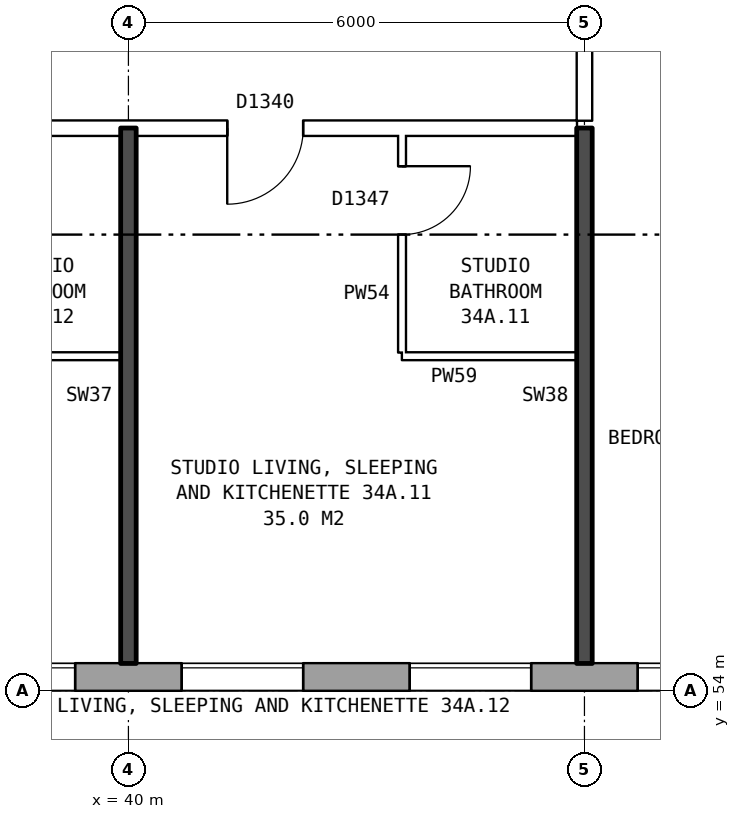
"""IFC4 building model, lengths in metres.
Left out: names, types, materials, properties, quantities, classifications, styles, units other than length and angle.
Written with IfcOpenShell. Run it as: python <this file> out.ifc"""

import sys

from ifc_helpers import new_model, si_unit, direction, frame, frame_2d, origin, place, context, subcontext, project, spatial, rectangle, extrude, element, fill, save


model = new_model("IFC4")
c1 = context("Model", 3, precision=1e-05, world=origin(), true_north=direction((0.0, 1.0)))
c2 = subcontext(c1, "Body", "Model", "MODEL_VIEW")
j1 = project(units=[si_unit("LENGTHUNIT", "METRE"), si_unit("PLANEANGLEUNIT", "RADIAN")], contexts=[c1])
p1 = place(None, origin())
s1 = spatial("IfcSite", under=j1, at=p1, CompositionType="ELEMENT")
p2 = place(p1, origin())
s2 = spatial("IfcBuilding", under=s1, at=p2, CompositionType="ELEMENT")
p3 = place(p2, frame((0.0, 0.0, 123.7)))
s3 = spatial("IfcBuildingStorey", under=s2, at=p3, CompositionType="ELEMENT", Elevation=123.7)
p4 = place(p3, frame((29.825, 54.18, 0.0), z_axis=(0.0, 0.0, 1.0), x_axis=(1.0, 0.0, 0.0)))
e1 = element("IfcWall", 1, at=p4, inside=s3, PredefinedType="STANDARD", context=c2, shape_type="SweptSolid", body=[
    extrude(rectangle(XDim=43.101, YDim=0.36, at=frame_2d((21.55, 0.0))), origin(), (0.0, 0.0, 1.0), 2.85),
])
p5 = place(p4, frame((0.3, 0.0, 0.8)))
e2 = element("IfcOpeningElement", 2, at=p5, cuts=e1, PredefinedType="OPENING", context=c2, shape_type="SweptSolid", body=[
    extrude(rectangle(XDim=1.6, YDim=1.8, at=frame_2d((0.8, 0.9))), frame((0.0, 0.19, 0.0), z_axis=(0.0, -1.0, 0.0), x_axis=(1.0, 0.0, 0.0)), (0.0, 0.0, 1.0), 0.38),
])
p6 = place(p4, frame((4.875, 0.0, 0.8)))
e3 = element("IfcOpeningElement", 3, at=p6, cuts=e1, PredefinedType="OPENING", context=c2, shape_type="SweptSolid", body=[
    extrude(rectangle(XDim=1.6, YDim=1.8, at=frame_2d((0.8, 0.9))), frame((0.0, 0.19, 0.0), z_axis=(0.0, -1.0, 0.0), x_axis=(1.0, 0.0, 0.0)), (0.0, 0.0, 1.0), 0.38),
])
p7 = place(p4, frame((7.875, 0.0, 0.8)))
e4 = element("IfcOpeningElement", 4, at=p7, cuts=e1, PredefinedType="OPENING", context=c2, shape_type="SweptSolid", body=[
    extrude(rectangle(XDim=1.6, YDim=1.8, at=frame_2d((0.8, 0.9))), frame((0.0, 0.19, 0.0), z_axis=(0.0, -1.0, 0.0), x_axis=(1.0, 0.0, 0.0)), (0.0, 0.0, 1.0), 0.38),
])
p8 = place(p4, frame((10.875, 0.0, 0.8)))
e5 = element("IfcOpeningElement", 5, at=p8, cuts=e1, PredefinedType="OPENING", context=c2, shape_type="SweptSolid", body=[
    extrude(rectangle(XDim=1.6, YDim=1.8, at=frame_2d((0.8, 0.9))), frame((0.0, 0.19, 0.0), z_axis=(0.0, -1.0, 0.0), x_axis=(1.0, 0.0, 0.0)), (0.0, 0.0, 1.0), 0.38),
])
p9 = place(p4, frame((13.875, 0.0, 0.8)))
e6 = element("IfcOpeningElement", 6, at=p9, cuts=e1, PredefinedType="OPENING", context=c2, shape_type="SweptSolid", body=[
    extrude(rectangle(XDim=1.6, YDim=1.8, at=frame_2d((0.8, 0.9))), frame((0.0, 0.19, 0.0), z_axis=(0.0, -1.0, 0.0), x_axis=(1.0, 0.0, 0.0)), (0.0, 0.0, 1.0), 0.38),
])
p10 = place(p4, frame((16.875, 0.0, 0.8)))
e7 = element("IfcOpeningElement", 7, at=p10, cuts=e1, PredefinedType="OPENING", context=c2, shape_type="SweptSolid", body=[
    extrude(rectangle(XDim=1.6, YDim=1.8, at=frame_2d((0.8, 0.9))), frame((0.0, 0.19, 0.0), z_axis=(0.0, -1.0, 0.0), x_axis=(1.0, 0.0, 0.0)), (0.0, 0.0, 1.0), 0.38),
])
p11 = place(p4, frame((19.875, 0.0, 0.8)))
e8 = element("IfcOpeningElement", 8, at=p11, cuts=e1, PredefinedType="OPENING", context=c2, shape_type="SweptSolid", body=[
    extrude(rectangle(XDim=1.6, YDim=1.8, at=frame_2d((0.8, 0.9))), frame((0.0, 0.19, 0.0), z_axis=(0.0, -1.0, 0.0), x_axis=(1.0, 0.0, 0.0)), (0.0, 0.0, 1.0), 0.38),
])
p12 = place(p4, frame((22.875, 0.0, 0.8)))
e9 = element("IfcOpeningElement", 9, at=p12, cuts=e1, PredefinedType="OPENING", context=c2, shape_type="SweptSolid", body=[
    extrude(rectangle(XDim=1.6, YDim=1.8, at=frame_2d((0.8, 0.9))), frame((0.0, 0.19, 0.0), z_axis=(0.0, -1.0, 0.0), x_axis=(1.0, 0.0, 0.0)), (0.0, 0.0, 1.0), 0.38),
])
p13 = place(p4, frame((25.875, 0.0, 0.8)))
e10 = element("IfcOpeningElement", 10, at=p13, cuts=e1, PredefinedType="OPENING", context=c2, shape_type="SweptSolid", body=[
    extrude(rectangle(XDim=1.6, YDim=1.8, at=frame_2d((0.8, 0.9))), frame((0.0, 0.19, 0.0), z_axis=(0.0, -1.0, 0.0), x_axis=(1.0, 0.0, 0.0)), (0.0, 0.0, 1.0), 0.38),
])
p14 = place(p4, frame((28.875, 0.0, 0.8)))
e11 = element("IfcOpeningElement", 11, at=p14, cuts=e1, PredefinedType="OPENING", context=c2, shape_type="SweptSolid", body=[
    extrude(rectangle(XDim=1.6, YDim=1.8, at=frame_2d((0.8, 0.9))), frame((0.0, 0.19, 0.0), z_axis=(0.0, -1.0, 0.0), x_axis=(1.0, 0.0, 0.0)), (0.0, 0.0, 1.0), 0.38),
])
p15 = place(p4, frame((31.875, 0.0, 0.8)))
e12 = element("IfcOpeningElement", 12, at=p15, cuts=e1, PredefinedType="OPENING", context=c2, shape_type="SweptSolid", body=[
    extrude(rectangle(XDim=1.6, YDim=1.8, at=frame_2d((0.8, 0.9))), frame((0.0, 0.19, 0.0), z_axis=(0.0, -1.0, 0.0), x_axis=(1.0, 0.0, 0.0)), (0.0, 0.0, 1.0), 0.38),
])
p16 = place(p4, frame((34.875, 0.0, 0.8)))
e13 = element("IfcOpeningElement", 13, at=p16, cuts=e1, PredefinedType="OPENING", context=c2, shape_type="SweptSolid", body=[
    extrude(rectangle(XDim=1.6, YDim=1.8, at=frame_2d((0.8, 0.9))), frame((0.0, 0.19, 0.0), z_axis=(0.0, -1.0, 0.0), x_axis=(1.0, 0.0, 0.0)), (0.0, 0.0, 1.0), 0.38),
])
p17 = place(p4, frame((36.775, 0.0, 0.8)))
e14 = element("IfcOpeningElement", 14, at=p17, cuts=e1, PredefinedType="OPENING", context=c2, shape_type="SweptSolid", body=[
    extrude(rectangle(XDim=1.2, YDim=1.8, at=frame_2d((0.6, 0.9))), frame((0.0, 0.19, 0.0), z_axis=(0.0, -1.0, 0.0), x_axis=(1.0, 0.0, 0.0)), (0.0, 0.0, 1.0), 0.38),
])
p18 = place(p4, frame((40.875, 0.0, 0.8)))
e15 = element("IfcOpeningElement", 15, at=p18, cuts=e1, PredefinedType="OPENING", context=c2, shape_type="SweptSolid", body=[
    extrude(rectangle(XDim=1.6, YDim=1.8, at=frame_2d((0.8, 0.9))), frame((0.0, 0.19, 0.0), z_axis=(0.0, -1.0, 0.0), x_axis=(1.0, 0.0, 0.0)), (0.0, 0.0, 1.0), 0.38),
])
p19 = place(p4, frame((2.2, 0.0, 1.7)))
e16 = element("IfcOpeningElement", 16, at=p19, cuts=e1, PredefinedType="OPENING", context=c2, shape_type="SweptSolid", body=[
    extrude(rectangle(XDim=0.8, YDim=0.9, at=frame_2d((0.4, 0.45))), frame((0.0, 0.19, 0.0), z_axis=(0.0, -1.0, 0.0), x_axis=(1.0, 0.0, 0.0)), (0.0, 0.0, 1.0), 0.38),
])
p20 = place(p4, frame((38.275, 0.0, 0.8)))
e17 = element("IfcOpeningElement", 17, at=p20, cuts=e1, PredefinedType="OPENING", context=c2, shape_type="SweptSolid", body=[
    extrude(rectangle(XDim=0.6, YDim=0.9, at=frame_2d((0.3, 0.45))), frame((0.0, 0.19, 0.0), z_axis=(0.0, -1.0, 0.0), x_axis=(1.0, 0.0, 0.0)), (0.0, 0.0, 1.0), 0.38),
])
for number, where, z_axis, x_axis in (
    (18, (37.6, 58.4, 0.0), (0.0, 0.0, 1.0), (1.0, 0.0, 0.0)),
    (19, (43.6, 58.4, 0.0), (0.0, 0.0, 1.0), (1.0, 0.0, 0.0)),
):
    element("IfcWall", number, at=place(p3, frame(where, z_axis=z_axis, x_axis=x_axis)), inside=s3, PredefinedType="PARTITIONING", context=c2, shape_type="SweptSolid", body=[
        extrude(rectangle(XDim=2.3, YDim=0.1, at=frame_2d((1.15, 0.0))), origin(), (0.0, 0.0, 1.0), 2.85),
    ])
p21 = place(p3, frame((27.11, 61.4, 0.0), z_axis=(0.0, 0.0, 1.0), x_axis=(1.0, 0.0, 0.0)))
e20 = element("IfcWall", 20, at=p21, inside=s3, PredefinedType="PARTITIONING", context=c2, shape_type="SweptSolid", body=[
    extrude(rectangle(XDim=18.79, YDim=0.2, at=frame_2d((9.395, 0.0))), origin(), (0.0, 0.0, 1.0), 2.85),
])
p22 = place(p21, frame((14.19, 0.0, 0.0)))
e21 = element("IfcOpeningElement", 21, at=p22, cuts=e20, PredefinedType="OPENING", context=c2, shape_type="SweptSolid", body=[
    extrude(rectangle(XDim=1.0, YDim=2.1, at=frame_2d((0.5, 1.05))), frame((0.0, 0.11, 0.0), z_axis=(0.0, -1.0, 0.0), x_axis=(1.0, 0.0, 0.0)), (0.0, 0.0, 1.0), 0.22),
])
p23 = place(p21, frame((8.19, 0.0, 0.0)))
e22 = element("IfcOpeningElement", 22, at=p23, cuts=e20, PredefinedType="OPENING", context=c2, shape_type="SweptSolid", body=[
    extrude(rectangle(XDim=1.0, YDim=2.1, at=frame_2d((0.5, 1.05))), frame((0.0, 0.11, 0.0), z_axis=(0.0, -1.0, 0.0), x_axis=(1.0, 0.0, 0.0)), (0.0, 0.0, 1.0), 0.22),
])
p24 = place(p21, frame((1.745, 0.0, 0.0)))
e23 = element("IfcOpeningElement", 23, at=p24, cuts=e20, PredefinedType="OPENING", context=c2, shape_type="SweptSolid", body=[
    extrude(rectangle(XDim=1.0, YDim=2.1, at=frame_2d((0.5, 1.05))), frame((0.0, 0.11, 0.0), z_axis=(0.0, -1.0, 0.0), x_axis=(1.0, 0.0, 0.0)), (0.0, 0.0, 1.0), 0.22),
])
p25 = place(p3, frame((40.0, 54.36, 0.0), z_axis=(0.0, 0.0, 1.0), x_axis=(0.0, 1.0, 0.0)))
e24 = element("IfcWall", 24, at=p25, inside=s3, PredefinedType="SOLIDWALL", context=c2, shape_type="SweptSolid", body=[
    extrude(rectangle(XDim=7.04, YDim=0.2, at=frame_2d((3.52, 0.0))), origin(), (0.0, 0.0, 1.0), 2.85),
])
p26 = place(p3, frame((43.6, 58.45, 0.0), z_axis=(0.0, 0.0, 1.0), x_axis=(0.0, 1.0, 0.0)))
e25 = element("IfcWall", 25, at=p26, inside=s3, PredefinedType="PARTITIONING", context=c2, shape_type="SweptSolid", body=[
    extrude(rectangle(XDim=2.85, YDim=0.1, at=frame_2d((1.425, 0.0))), origin(), (0.0, 0.0, 1.0), 2.85),
])
p27 = place(p26, frame((1.55, 0.0, 0.0)))
e26 = element("IfcOpeningElement", 26, at=p27, cuts=e25, PredefinedType="OPENING", context=c2, shape_type="SweptSolid", body=[
    extrude(rectangle(XDim=0.9, YDim=2.1, at=frame_2d((0.45, 1.05))), frame((0.0, 0.06, 0.0), z_axis=(0.0, -1.0, 0.0), x_axis=(1.0, 0.0, 0.0)), (0.0, 0.0, 1.0), 0.12),
])
p28 = place(p3, frame((46.0, 54.36, 0.0), z_axis=(0.0, 0.0, 1.0), x_axis=(0.0, 1.0, 0.0)))
e27 = element("IfcWall", 27, at=p28, inside=s3, PredefinedType="SOLIDWALL", context=c2, shape_type="SweptSolid", body=[
    extrude(rectangle(XDim=7.04, YDim=0.2, at=frame_2d((3.52, 0.0))), origin(), (0.0, 0.0, 1.0), 2.85),
])
p29 = place(p3, frame((46.0, 61.5, 0.0), z_axis=(0.0, 0.0, 1.0), x_axis=(0.0, 1.0, 0.0)))
e28 = element("IfcWall", 28, at=p29, inside=s3, PredefinedType="PARTITIONING", context=c2, shape_type="SweptSolid", body=[
    extrude(rectangle(XDim=2.2, YDim=0.2, at=frame_2d((1.1, 0.0))), origin(), (0.0, 0.0, 1.0), 2.85),
])
p30 = place(p7, origin())
e29 = element("IfcWindow", 29, at=p30, inside=s3, PartitioningType="SINGLE_PANEL", PredefinedType="WINDOW", context=c2, shape_type="SweptSolid", body=[
    extrude(rectangle(XDim=1.6, YDim=1.8, at=frame_2d((0.8, 0.9))), frame((0.0, 0.15, 0.0), z_axis=(0.0, -1.0, 0.0), x_axis=(1.0, 0.0, 0.0)), (0.0, 0.0, 1.0), 0.06),
])
fill(e4, e29)
p31 = place(p8, origin())
e30 = element("IfcWindow", 30, at=p31, inside=s3, PartitioningType="SINGLE_PANEL", PredefinedType="WINDOW", context=c2, shape_type="SweptSolid", body=[
    extrude(rectangle(XDim=1.6, YDim=1.8, at=frame_2d((0.8, 0.9))), frame((0.0, 0.15, 0.0), z_axis=(0.0, -1.0, 0.0), x_axis=(1.0, 0.0, 0.0)), (0.0, 0.0, 1.0), 0.06),
])
fill(e5, e30)
p32 = place(p9, origin())
e31 = element("IfcWindow", 31, at=p32, inside=s3, PartitioningType="SINGLE_PANEL", PredefinedType="WINDOW", context=c2, shape_type="SweptSolid", body=[
    extrude(rectangle(XDim=1.6, YDim=1.8, at=frame_2d((0.8, 0.9))), frame((0.0, 0.15, 0.0), z_axis=(0.0, -1.0, 0.0), x_axis=(1.0, 0.0, 0.0)), (0.0, 0.0, 1.0), 0.06),
])
fill(e6, e31)
p33 = place(p10, origin())
e32 = element("IfcWindow", 32, at=p33, inside=s3, PartitioningType="SINGLE_PANEL", PredefinedType="WINDOW", context=c2, shape_type="SweptSolid", body=[
    extrude(rectangle(XDim=1.6, YDim=1.8, at=frame_2d((0.8, 0.9))), frame((0.0, 0.15, 0.0), z_axis=(0.0, -1.0, 0.0), x_axis=(1.0, 0.0, 0.0)), (0.0, 0.0, 1.0), 0.06),
])
fill(e7, e32)
p34 = place(p22, frame((1.0, 0.0, 0.0), z_axis=(0.0, 0.0, 1.0), x_axis=(-1.0, 0.0, 0.0)))
e33 = element("IfcDoor", 33, at=p34, inside=s3, OperationType="SINGLE_SWING_RIGHT", PredefinedType="DOOR", context=c2, shape_type="SweptSolid", body=[
    extrude(rectangle(XDim=1.0, YDim=2.1, at=frame_2d((0.5, 1.05))), frame((0.0, 0.025, 0.0), z_axis=(0.0, -1.0, 0.0), x_axis=(1.0, 0.0, 0.0)), (0.0, 0.0, 1.0), 0.05),
])
fill(e21, e33)
p35 = place(p27, frame((0.9, 0.0, 0.0), z_axis=(0.0, 0.0, 1.0), x_axis=(-1.0, 0.0, 0.0)))
e34 = element("IfcDoor", 34, at=p35, inside=s3, OperationType="SINGLE_SWING_LEFT", PredefinedType="DOOR", context=c2, shape_type="SweptSolid", body=[
    extrude(rectangle(XDim=0.9, YDim=2.1, at=frame_2d((0.45, 1.05))), frame((0.0, 0.025, 0.0), z_axis=(0.0, -1.0, 0.0), x_axis=(1.0, 0.0, 0.0)), (0.0, 0.0, 1.0), 0.05),
])
fill(e26, e34)
save(model, sys.argv[1])
